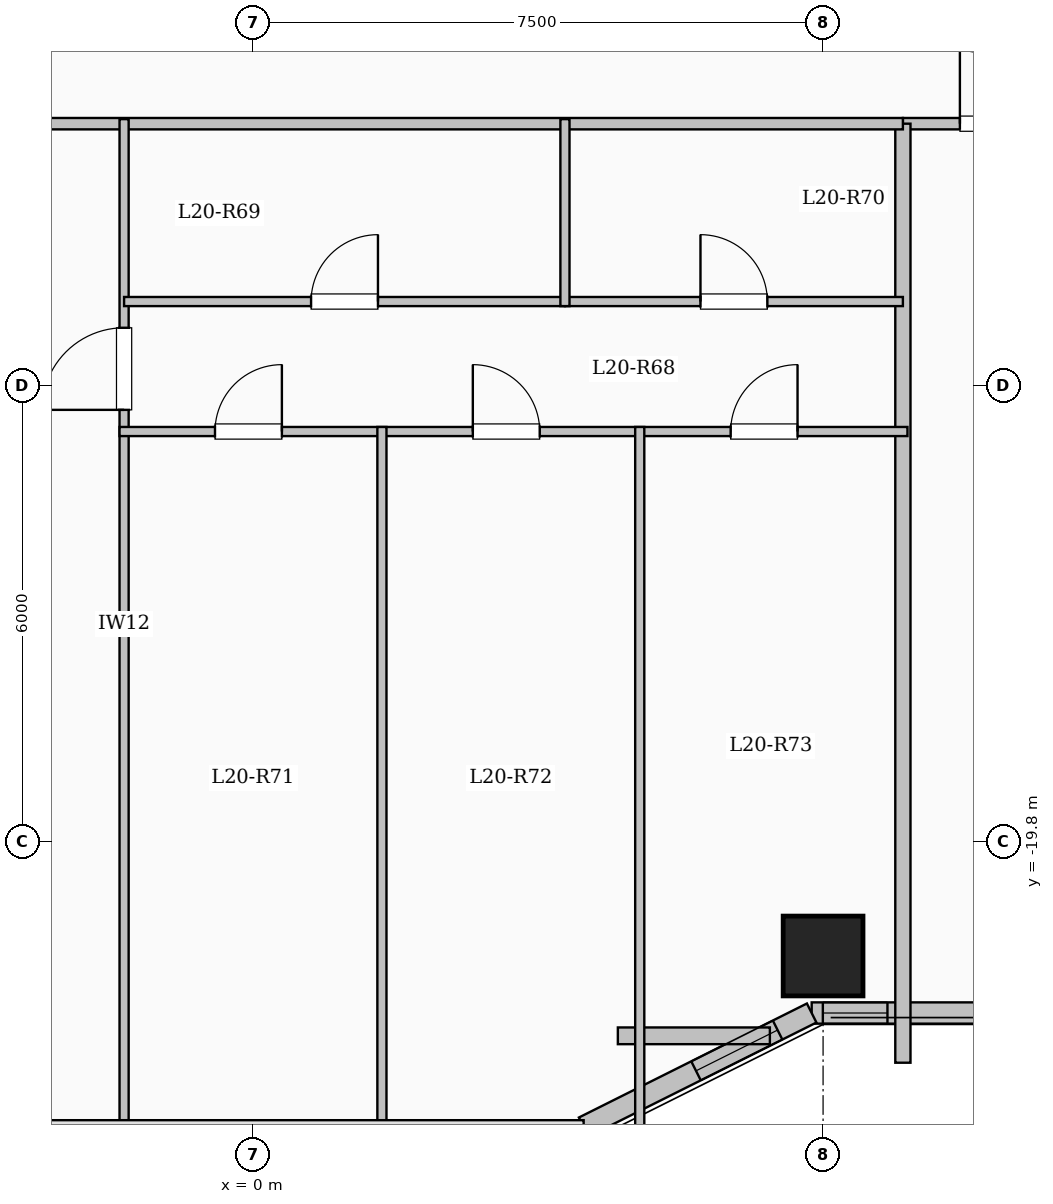
"""IFC4 building model, lengths in metres.
Left out: names, types, materials, properties, quantities, classifications, styles, units other than length and angle.
Written with IfcOpenShell. Run it as: python <this file> out.ifc"""

import sys

from ifc_helpers import new_model, si_unit, direction, frame, frame_2d, origin, origin_2d, place, context, subcontext, project, spatial, rectangle, extrude, element, fill, save


model = new_model("IFC4")
c1 = context("Model", 3, precision=1e-05, world=origin(), true_north=direction((0.0, 1.0)))
c2 = subcontext(c1, "Body", "Model", "MODEL_VIEW")
j1 = project(units=[si_unit("LENGTHUNIT", "METRE"), si_unit("PLANEANGLEUNIT", "RADIAN")], contexts=[c1])
p1 = place(None, origin())
s1 = spatial("IfcSite", under=j1, at=p1, CompositionType="ELEMENT")
p2 = place(p1, origin())
s2 = spatial("IfcBuilding", under=s1, at=p2, CompositionType="ELEMENT")
p3 = place(p2, frame((0.0, 0.0, 78.3)))
s3 = spatial("IfcBuildingStorey", under=s2, at=p3, CompositionType="ELEMENT", Elevation=78.3)
p4 = place(p3, frame((7.5, -21.3, 0.0), z_axis=(0.0, 0.0, 1.0), x_axis=(1.0, 0.0, 0.0)))
e1 = element("IfcColumn", 1, at=p4, inside=s3, PredefinedType="COLUMN", context=c2, shape_type="SweptSolid", body=[
    extrude(rectangle(XDim=1.05, YDim=1.05, at=origin_2d()), origin(), (0.0, 0.0, 1.0), 3.35),
])
p5 = place(p3, frame((21.15, -22.05, 0.0), z_axis=(0.0, 0.0, 1.0), x_axis=(-1.0, 0.0, 0.0)))
e2 = element("IfcWall", 2, at=p5, inside=s3, PredefinedType="SOLIDWALL", context=c2, shape_type="SweptSolid", body=[
    extrude(rectangle(XDim=13.8, YDim=0.28, at=frame_2d((6.9, 0.0))), origin(), (0.0, 0.0, 1.0), 3.1),
])
p6 = place(p5, frame((0.88, 0.0, 0.95)))
e3 = element("IfcOpeningElement", 3, at=p6, cuts=e2, PredefinedType="OPENING", context=c2, shape_type="SweptSolid", body=[
    extrude(rectangle(XDim=1.2, YDim=1.5, at=frame_2d((0.6, 0.75))), frame((0.0, 0.15, 0.0), z_axis=(0.0, -1.0, 0.0), x_axis=(1.0, 0.0, 0.0)), (0.0, 0.0, 1.0), 0.3),
])
p7 = place(p5, frame((3.64, 0.0, 0.95)))
e4 = element("IfcOpeningElement", 4, at=p7, cuts=e2, PredefinedType="OPENING", context=c2, shape_type="SweptSolid", body=[
    extrude(rectangle(XDim=1.2, YDim=1.5, at=frame_2d((0.6, 0.75))), frame((0.0, 0.15, 0.0), z_axis=(0.0, -1.0, 0.0), x_axis=(1.0, 0.0, 0.0)), (0.0, 0.0, 1.0), 0.3),
])
p8 = place(p5, frame((6.35, 0.0, 0.95)))
e5 = element("IfcOpeningElement", 5, at=p8, cuts=e2, PredefinedType="OPENING", context=c2, shape_type="SweptSolid", body=[
    extrude(rectangle(XDim=1.2, YDim=1.5, at=frame_2d((0.6, 0.75))), frame((0.0, 0.15, 0.0), z_axis=(0.0, -1.0, 0.0), x_axis=(1.0, 0.0, 0.0)), (0.0, 0.0, 1.0), 0.3),
])
p9 = place(p5, frame((9.238, 0.0, 0.9)))
e6 = element("IfcOpeningElement", 6, at=p9, cuts=e2, PredefinedType="OPENING", context=c2, shape_type="SweptSolid", body=[
    extrude(rectangle(XDim=2.4, YDim=1.8, at=frame_2d((1.2, 0.9))), frame((0.0, 0.15, 0.0), z_axis=(0.0, -1.0, 0.0), x_axis=(1.0, 0.0, 0.0)), (0.0, 0.0, 1.0), 0.3),
])
p10 = place(p5, frame((12.803, 0.0, 0.95)))
e7 = element("IfcOpeningElement", 7, at=p10, cuts=e2, PredefinedType="OPENING", context=c2, shape_type="SweptSolid", body=[
    extrude(rectangle(XDim=0.85, YDim=1.5, at=frame_2d((0.425, 0.75))), frame((0.0, 0.15, 0.0), z_axis=(0.0, -1.0, 0.0), x_axis=(1.0, 0.0, 0.0)), (0.0, 0.0, 1.0), 0.3),
])
p11 = place(p3, frame((7.35, -22.05, 0.0), z_axis=(0.0, 0.0, 1.0), x_axis=(-0.894427191, -0.4472135955, 0.0)))
e8 = element("IfcWall", 8, at=p11, inside=s3, PredefinedType="SOLIDWALL", context=c2, shape_type="SweptSolid", body=[
    extrude(rectangle(XDim=3.354, YDim=0.28, at=frame_2d((1.677, 0.0))), origin(), (0.0, 0.0, 1.0), 3.1),
])
p12 = place(p11, frame((0.501, 0.0, 0.95)))
e9 = element("IfcOpeningElement", 9, at=p12, cuts=e8, PredefinedType="OPENING", context=c2, shape_type="SweptSolid", body=[
    extrude(rectangle(XDim=1.2, YDim=1.5, at=frame_2d((0.6, 0.75))), frame((0.0, 0.15, 0.0), z_axis=(0.0, -1.0, 0.0), x_axis=(1.0, 0.0, 0.0)), (0.0, 0.0, 1.0), 0.3),
])
p13 = place(p3, frame((4.8, -22.35, 0.0), z_axis=(0.0, 0.0, 1.0), x_axis=(1.0, 0.0, 0.0)))
e10 = element("IfcWall", 10, at=p13, inside=s3, PredefinedType="PARAPET", context=c2, shape_type="SweptSolid", body=[
    extrude(rectangle(XDim=2.0, YDim=0.22, at=frame_2d((1.0, 0.0))), origin(), (0.0, 0.0, 1.0), 0.85),
])
p14 = place(p3, frame((8.55, -10.35, 0.0), z_axis=(0.0, 0.0, 1.0), x_axis=(1.0, 0.0, 0.0)))
e11 = element("IfcWall", 11, at=p14, inside=s3, PredefinedType="PARTITIONING", context=c2, shape_type="SweptSolid", body=[
    extrude(rectangle(XDim=12.5, YDim=0.15, at=frame_2d((6.25, 0.0))), origin(), (0.0, 0.0, 1.0), 3.1),
])
p15 = place(p14, frame((0.75, 0.0, 0.0)))
e12 = element("IfcOpeningElement", 12, at=p15, cuts=e11, PredefinedType="OPENING", context=c2, shape_type="SweptSolid", body=[
    extrude(rectangle(XDim=0.96, YDim=2.15, at=frame_2d((0.48, 1.075))), frame((0.0, 0.085, 0.0), z_axis=(0.0, -1.0, 0.0), x_axis=(1.0, 0.0, 0.0)), (0.0, 0.0, 1.0), 0.17),
])
p16 = place(p3, frame((8.55, -22.704, 0.0), z_axis=(0.0, 0.0, 1.0), x_axis=(0.0, 1.0, 0.0)))
e13 = element("IfcWall", 13, at=p16, inside=s3, PredefinedType="SOLIDWALL", context=c2, shape_type="SweptSolid", body=[
    extrude(rectangle(XDim=12.354, YDim=0.2, at=frame_2d((6.177, 0.0))), origin(), (0.0, 0.0, 1.0), 3.1),
])
p17 = place(p3, frame((-8.55, -10.35, 0.0), z_axis=(0.0, 0.0, 1.0), x_axis=(1.0, 0.0, 0.0)))
e14 = element("IfcWall", 14, at=p17, inside=s3, PredefinedType="PARTITIONING", context=c2, shape_type="SweptSolid", body=[
    extrude(rectangle(XDim=17.1, YDim=0.15, at=frame_2d((8.55, 0.0))), origin(), (0.0, 0.0, 1.0), 3.1),
])
p18 = place(p17, frame((1.6, 0.0, 0.0)))
e15 = element("IfcOpeningElement", 15, at=p18, cuts=e14, PredefinedType="OPENING", context=c2, shape_type="SweptSolid", body=[
    extrude(rectangle(XDim=0.96, YDim=2.15, at=frame_2d((0.48, 1.075))), frame((0.0, 0.085, 0.0), z_axis=(0.0, -1.0, 0.0), x_axis=(1.0, 0.0, 0.0)), (0.0, 0.0, 1.0), 0.17),
])
p19 = place(p3, frame((-1.696, -23.58, 0.0), z_axis=(0.0, 0.0, 1.0), x_axis=(0.0, 1.0, 0.0)))
e16 = element("IfcWall", 16, at=p19, inside=s3, PredefinedType="PARTITIONING", context=c2, shape_type="SweptSolid", body=[
    extrude(rectangle(XDim=13.29, YDim=0.12, at=frame_2d((6.645, 0.0))), origin(), (0.0, 0.0, 1.0), 3.1),
])
p20 = place(p19, frame((9.465, 0.0, 0.0)))
e17 = element("IfcOpeningElement", 17, at=p20, cuts=e16, PredefinedType="OPENING", context=c2, shape_type="SweptSolid", body=[
    extrude(rectangle(XDim=1.08, YDim=2.15, at=frame_2d((0.54, 1.075))), frame((0.0, 0.07, 0.0), z_axis=(0.0, -1.0, 0.0), x_axis=(1.0, 0.0, 0.0)), (0.0, 0.0, 1.0), 0.14),
])
p21 = place(p3, frame((-1.696, -12.69, 0.0), z_axis=(0.0, 0.0, 1.0), x_axis=(1.0, 0.0, 0.0)))
e18 = element("IfcWall", 18, at=p21, inside=s3, PredefinedType="PARTITIONING", context=c2, shape_type="SweptSolid", body=[
    extrude(rectangle(XDim=5.8, YDim=0.12, at=frame_2d((2.9, 0.0))), origin(), (0.0, 0.0, 1.0), 2.635),
])
p22 = place(p21, frame((2.46, 0.0, 0.0)))
e19 = element("IfcOpeningElement", 19, at=p22, cuts=e18, PredefinedType="OPENING", context=c2, shape_type="SweptSolid", body=[
    extrude(rectangle(XDim=0.88, YDim=2.1, at=frame_2d((0.44, 1.05))), frame((0.0, 0.07, 0.0), z_axis=(0.0, -1.0, 0.0), x_axis=(1.0, 0.0, 0.0)), (0.0, 0.0, 1.0), 0.14),
])
p23 = place(p3, frame((4.104, -12.69, 0.0), z_axis=(0.0, 0.0, 1.0), x_axis=(1.0, 0.0, 0.0)))
e20 = element("IfcWall", 20, at=p23, inside=s3, PredefinedType="PARTITIONING", context=c2, shape_type="SweptSolid", body=[
    extrude(rectangle(XDim=4.446, YDim=0.12, at=frame_2d((2.223, 0.0))), origin(), (0.0, 0.0, 1.0), 2.635),
])
p24 = place(p23, frame((1.783, 0.0, 0.0)))
e21 = element("IfcOpeningElement", 21, at=p24, cuts=e20, PredefinedType="OPENING", context=c2, shape_type="SweptSolid", body=[
    extrude(rectangle(XDim=0.88, YDim=2.1, at=frame_2d((0.44, 1.05))), frame((0.0, 0.07, 0.0), z_axis=(0.0, -1.0, 0.0), x_axis=(1.0, 0.0, 0.0)), (0.0, 0.0, 1.0), 0.14),
])
p25 = place(p3, frame((-1.756, -14.4, 0.0), z_axis=(0.0, 0.0, 1.0), x_axis=(1.0, 0.0, 0.0)))
e22 = element("IfcWall", 22, at=p25, inside=s3, PredefinedType="PARTITIONING", context=c2, shape_type="SweptSolid", body=[
    extrude(rectangle(XDim=10.366, YDim=0.12, at=frame_2d((5.183, 0.0))), origin(), (0.0, 0.0, 1.0), 2.635),
])
p26 = place(p25, frame((1.256, 0.0, 0.0)))
e23 = element("IfcOpeningElement", 23, at=p26, cuts=e22, PredefinedType="OPENING", context=c2, shape_type="SweptSolid", body=[
    extrude(rectangle(XDim=0.88, YDim=2.1, at=frame_2d((0.44, 1.05))), frame((0.0, 0.07, 0.0), z_axis=(0.0, -1.0, 0.0), x_axis=(1.0, 0.0, 0.0)), (0.0, 0.0, 1.0), 0.14),
])
p27 = place(p25, frame((4.648, 0.0, 0.0)))
e24 = element("IfcOpeningElement", 24, at=p27, cuts=e22, PredefinedType="OPENING", context=c2, shape_type="SweptSolid", body=[
    extrude(rectangle(XDim=0.88, YDim=2.1, at=frame_2d((0.44, 1.05))), frame((0.0, 0.07, 0.0), z_axis=(0.0, -1.0, 0.0), x_axis=(1.0, 0.0, 0.0)), (0.0, 0.0, 1.0), 0.14),
])
p28 = place(p25, frame((8.04, 0.0, 0.0)))
e25 = element("IfcOpeningElement", 25, at=p28, cuts=e22, PredefinedType="OPENING", context=c2, shape_type="SweptSolid", body=[
    extrude(rectangle(XDim=0.88, YDim=2.1, at=frame_2d((0.44, 1.05))), frame((0.0, 0.07, 0.0), z_axis=(0.0, -1.0, 0.0), x_axis=(1.0, 0.0, 0.0)), (0.0, 0.0, 1.0), 0.14),
])
p29 = place(p3, frame((4.104, -12.75, 0.0), z_axis=(0.0, 0.0, 1.0), x_axis=(0.0, 1.0, 0.0)))
e26 = element("IfcWall", 26, at=p29, inside=s3, PredefinedType="PARTITIONING", context=c2, shape_type="SweptSolid", body=[
    extrude(rectangle(XDim=2.46, YDim=0.12, at=frame_2d((1.23, 0.0))), origin(), (0.0, 0.0, 1.0), 3.1),
])
p30 = place(p3, frame((1.696, -23.58, 0.0), z_axis=(0.0, 0.0, 1.0), x_axis=(0.0, 1.0, 0.0)))
e27 = element("IfcWall", 27, at=p30, inside=s3, PredefinedType="PARTITIONING", context=c2, shape_type="SweptSolid", body=[
    extrude(rectangle(XDim=9.24, YDim=0.12, at=frame_2d((4.62, 0.0))), origin(), (0.0, 0.0, 1.0), 3.1),
])
p31 = place(p3, frame((5.088, -23.558, 0.0), z_axis=(0.0, 0.0, 1.0), x_axis=(0.0, 1.0, 0.0)))
e28 = element("IfcWall", 28, at=p31, inside=s3, PredefinedType="PARTITIONING", context=c2, shape_type="SweptSolid", body=[
    extrude(rectangle(XDim=9.218, YDim=0.12, at=frame_2d((4.609, 0.0))), origin(), (0.0, 0.0, 1.0), 3.1),
])
p32 = place(p10, origin())
e29 = element("IfcWindow", 29, at=p32, inside=s3, PartitioningType="SINGLE_PANEL", PredefinedType="WINDOW", context=c2, shape_type="SweptSolid", body=[
    extrude(rectangle(XDim=0.85, YDim=1.5, at=frame_2d((0.425, 0.75))), frame((0.0, 0.03, 0.0), z_axis=(0.0, -1.0, 0.0), x_axis=(1.0, 0.0, 0.0)), (0.0, 0.0, 1.0), 0.06),
])
fill(e7, e29)
p33 = place(p12, origin())
e30 = element("IfcWindow", 30, at=p33, inside=s3, PartitioningType="SINGLE_PANEL", PredefinedType="WINDOW", context=c2, shape_type="SweptSolid", body=[
    extrude(rectangle(XDim=1.2, YDim=1.5, at=frame_2d((0.6, 0.75))), frame((0.0, 0.03, 0.0), z_axis=(0.0, -1.0, 0.0), x_axis=(1.0, 0.0, 0.0)), (0.0, 0.0, 1.0), 0.06),
])
fill(e9, e30)
p34 = place(p15, origin())
e31 = element("IfcDoor", 31, at=p34, inside=s3, OperationType="SINGLE_SWING_LEFT", PredefinedType="DOOR", context=c2, shape_type="SweptSolid", body=[
    extrude(rectangle(XDim=0.96, YDim=2.15, at=frame_2d((0.48, 1.075))), frame((0.0, 0.025, 0.0), z_axis=(0.0, -1.0, 0.0), x_axis=(1.0, 0.0, 0.0)), (0.0, 0.0, 1.0), 0.05),
])
fill(e12, e31)
p35 = place(p20, origin())
e32 = element("IfcDoor", 32, at=p35, inside=s3, OperationType="SINGLE_SWING_LEFT", PredefinedType="DOOR", context=c2, shape_type="SweptSolid", body=[
    extrude(rectangle(XDim=1.08, YDim=2.15, at=frame_2d((0.54, 1.075))), frame((0.0, 0.025, 0.0), z_axis=(0.0, -1.0, 0.0), x_axis=(1.0, 0.0, 0.0)), (0.0, 0.0, 1.0), 0.05),
])
fill(e17, e32)
p36 = place(p22, origin())
e33 = element("IfcDoor", 33, at=p36, inside=s3, OperationType="SINGLE_SWING_RIGHT", PredefinedType="DOOR", context=c2, shape_type="SweptSolid", body=[
    extrude(rectangle(XDim=0.88, YDim=2.1, at=frame_2d((0.44, 1.05))), frame((0.0, 0.025, 0.0), z_axis=(0.0, -1.0, 0.0), x_axis=(1.0, 0.0, 0.0)), (0.0, 0.0, 1.0), 0.05),
])
fill(e19, e33)
p37 = place(p24, origin())
e34 = element("IfcDoor", 34, at=p37, inside=s3, OperationType="SINGLE_SWING_LEFT", PredefinedType="DOOR", context=c2, shape_type="SweptSolid", body=[
    extrude(rectangle(XDim=0.88, YDim=2.1, at=frame_2d((0.44, 1.05))), frame((0.0, 0.025, 0.0), z_axis=(0.0, -1.0, 0.0), x_axis=(1.0, 0.0, 0.0)), (0.0, 0.0, 1.0), 0.05),
])
fill(e21, e34)
p38 = place(p26, origin())
e35 = element("IfcDoor", 35, at=p38, inside=s3, OperationType="SINGLE_SWING_RIGHT", PredefinedType="DOOR", context=c2, shape_type="SweptSolid", body=[
    extrude(rectangle(XDim=0.88, YDim=2.1, at=frame_2d((0.44, 1.05))), frame((0.0, 0.025, 0.0), z_axis=(0.0, -1.0, 0.0), x_axis=(1.0, 0.0, 0.0)), (0.0, 0.0, 1.0), 0.05),
])
fill(e23, e35)
p39 = place(p27, origin())
e36 = element("IfcDoor", 36, at=p39, inside=s3, OperationType="SINGLE_SWING_LEFT", PredefinedType="DOOR", context=c2, shape_type="SweptSolid", body=[
    extrude(rectangle(XDim=0.88, YDim=2.1, at=frame_2d((0.44, 1.05))), frame((0.0, 0.025, 0.0), z_axis=(0.0, -1.0, 0.0), x_axis=(1.0, 0.0, 0.0)), (0.0, 0.0, 1.0), 0.05),
])
fill(e24, e36)
p40 = place(p28, origin())
e37 = element("IfcDoor", 37, at=p40, inside=s3, OperationType="SINGLE_SWING_RIGHT", PredefinedType="DOOR", context=c2, shape_type="SweptSolid", body=[
    extrude(rectangle(XDim=0.88, YDim=2.1, at=frame_2d((0.44, 1.05))), frame((0.0, 0.025, 0.0), z_axis=(0.0, -1.0, 0.0), x_axis=(1.0, 0.0, 0.0)), (0.0, 0.0, 1.0), 0.05),
])
fill(e25, e37)
save(model, sys.argv[1])
